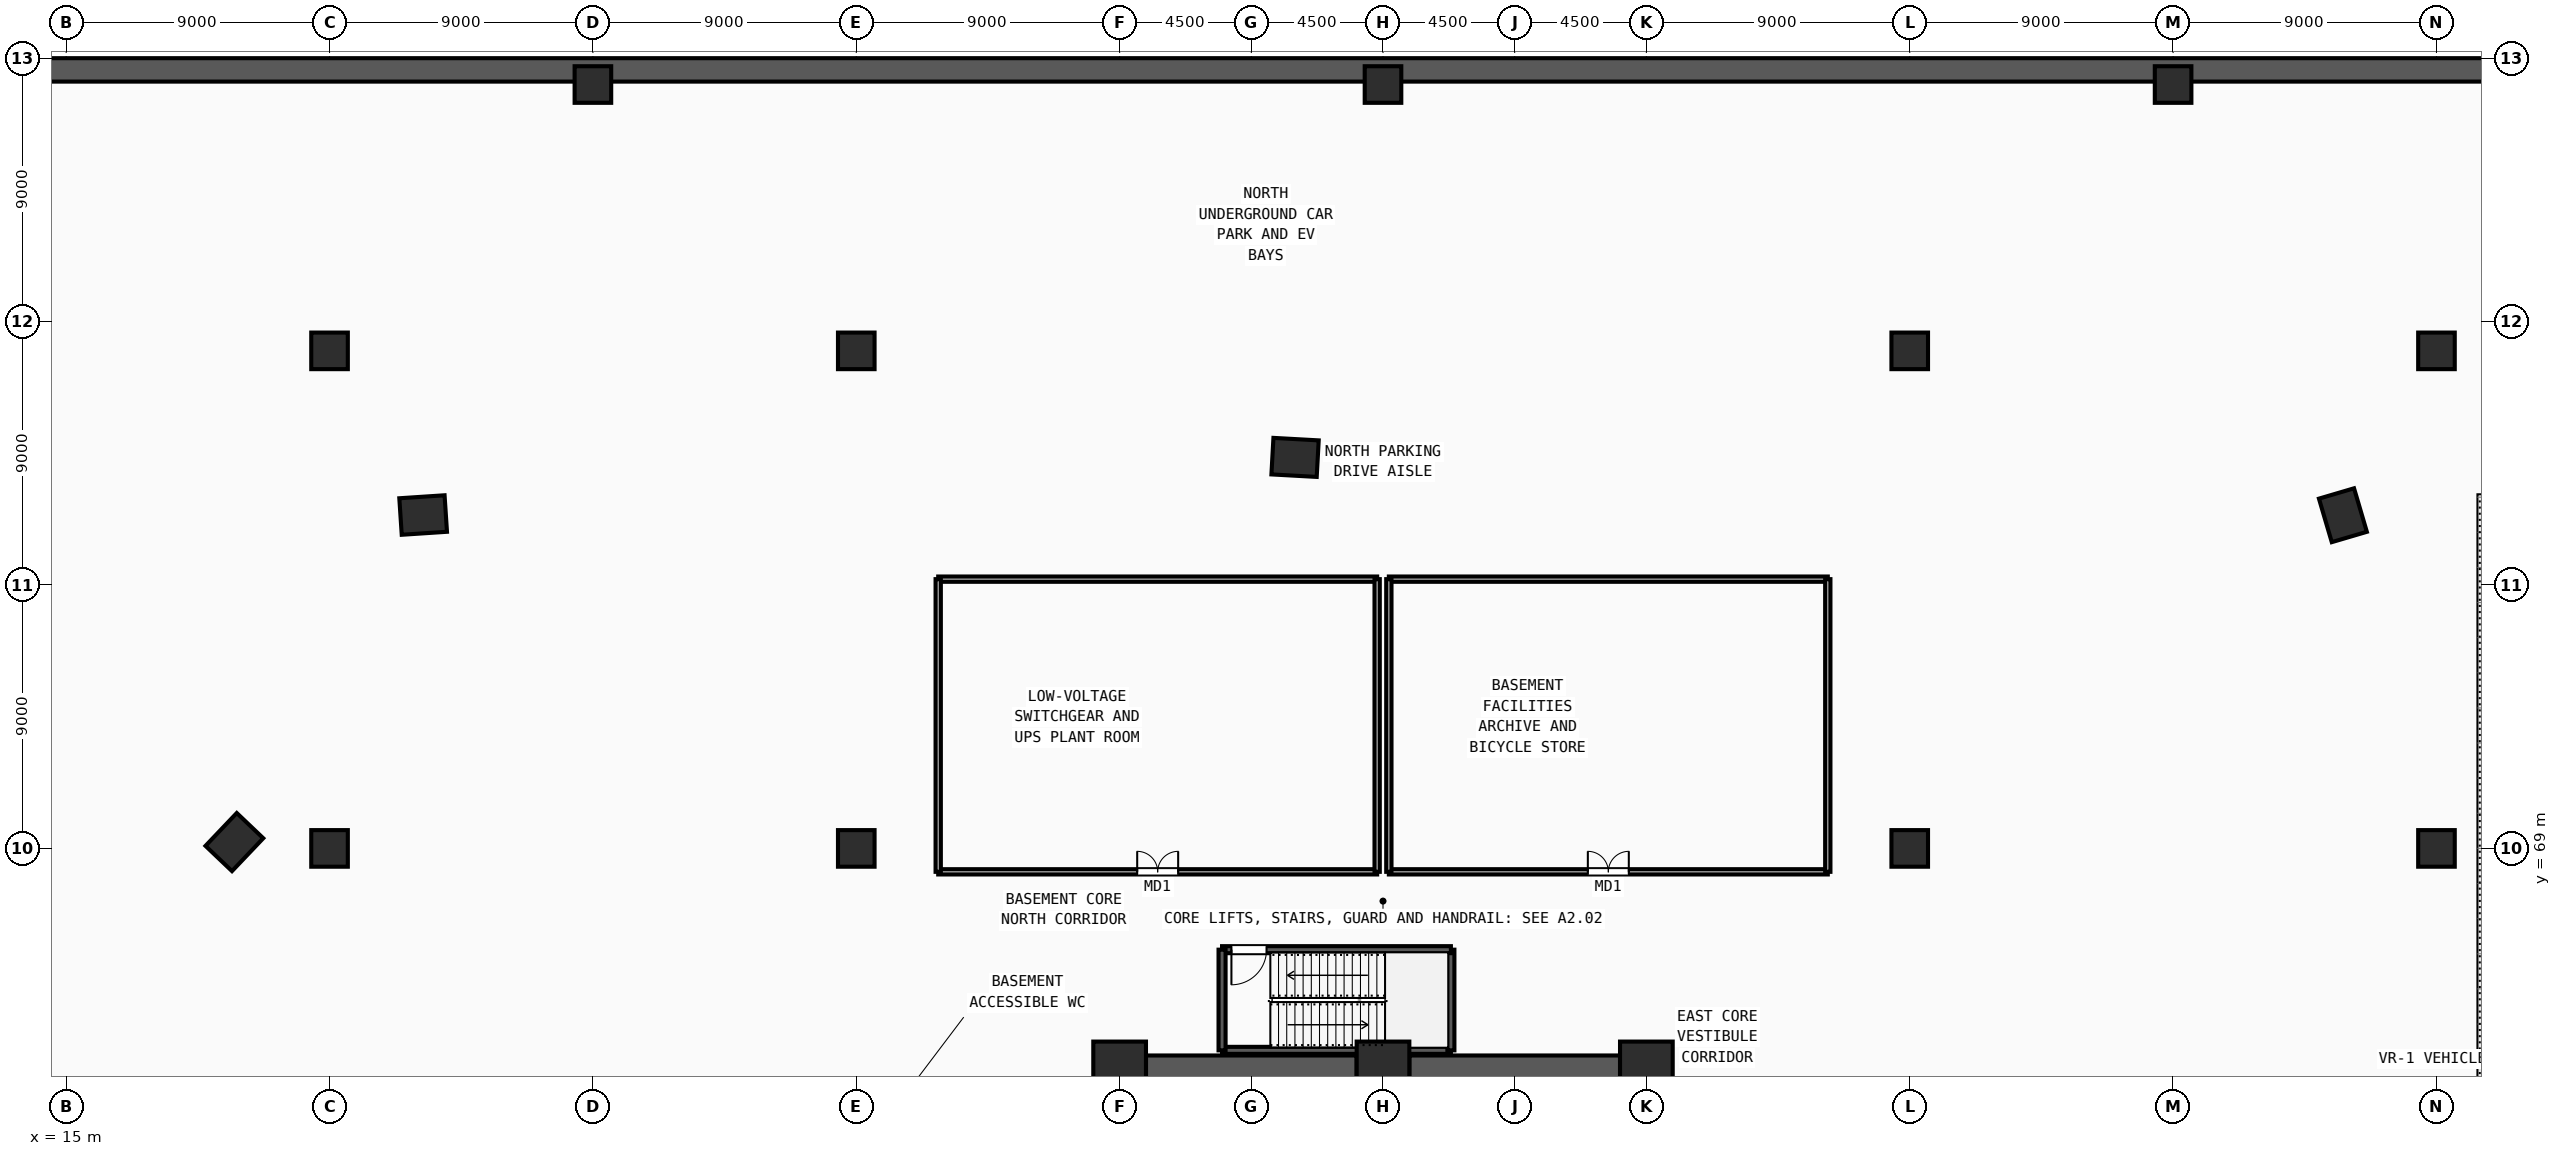
"""IFC4 building model, lengths in metres.
Left out: names, types, materials, properties, quantities, classifications, styles, units other than length and angle.
Written with IfcOpenShell. Run it as: python <this file> out.ifc"""

import sys

from ifc_helpers import new_model, si_unit, direction, frame, frame_2d, origin, origin_2d, place, context, subcontext, project, spatial, rectangle, extrude, source, transform, mapped, element, fill, save


model = new_model("IFC4")
c1 = context("Model", 3, precision=1e-05, world=origin(), true_north=direction((0.0, 1.0)))
c2 = subcontext(c1, "Body", "Model", "MODEL_VIEW")
j1 = project(units=[si_unit("LENGTHUNIT", "METRE"), si_unit("PLANEANGLEUNIT", "RADIAN")], contexts=[c1])
p1 = place(None, origin())
s1 = spatial("IfcSite", under=j1, at=p1, CompositionType="ELEMENT")
p2 = place(p1, origin())
s2 = spatial("IfcBuilding", under=s1, at=p2, CompositionType="ELEMENT")
p3 = place(p2, frame((0.0, 0.0, -4.8)))
s3 = spatial("IfcBuildingStorey", under=s2, at=p3, CompositionType="ELEMENT", Elevation=-4.8)
m1 = source(origin(), c2, "Body", "SweptSolid", [
    extrude(rectangle(XDim=1.8, YDim=1.8, at=origin_2d()), origin(), (0.0, 0.0, 1.0), 4.8),
])
for number, where, z_axis, x_axis in (
    (1, (69.0, 61.5, 0.0), (0.0, 0.0, 1.0), (1.0, 0.0, 0.0)),
    (2, (60.0, 61.5, 0.0), (0.0, 0.0, 1.0), (1.0, 0.0, 0.0)),
    (3, (51.0, 61.5, 0.0), (0.0, 0.0, 1.0), (1.0, 0.0, 0.0)),
):
    element("IfcColumn", number, at=place(p3, frame(where, z_axis=z_axis, x_axis=x_axis)), inside=s3, PredefinedType="COLUMN", context=c2, shape_type="MappedRepresentation", body=[
        mapped(m1, transform((0.0, 0.0, 0.0), x_axis=(1.0, 0.0, 0.0), y_axis=(0.0, 1.0, 0.0), z_axis=(0.0, 0.0, 1.0), scale=1.0)),
    ])
m2 = source(origin(), c2, "Body", "SweptSolid", [
    extrude(rectangle(XDim=1.55, YDim=1.25, at=origin_2d()), origin(), (0.0, 0.0, 1.0), 4.8),
])
for number, where, z_axis, x_axis in (
    (4, (20.748, 69.217, 0.0), (0.0, 0.0, 1.0), (0.689, 0.724, 0.0)),
    (5, (27.199, 80.391, 0.0), (0.0, 0.0, 1.0), (0.998, 0.066, 0.0)),
    (6, (92.803, 80.384, 0.0), (0.0, 0.0, 1.0), (-0.283, 0.959, 0.0)),
    (7, (56.995, 82.36, 0.0), (0.0, 0.0, 1.0), (-0.998, 0.055, 0.0)),
):
    element("IfcColumn", number, at=place(p3, frame(where, z_axis=z_axis, x_axis=x_axis)), inside=s3, PredefinedType="COLUMN", context=c2, shape_type="MappedRepresentation", body=[
        mapped(m2, transform((0.0, 0.0, 0.0), x_axis=(1.0, 0.0, 0.0), y_axis=(0.0, 1.0, 0.0), z_axis=(0.0, 0.0, 1.0), scale=1.0)),
    ])
m3 = source(origin(), c2, "Body", "SweptSolid", [
    extrude(rectangle(XDim=1.25, YDim=1.25, at=origin_2d()), origin(), (0.0, 0.0, 1.0), 4.8),
])
for number, where, z_axis, x_axis in (
    (8, (24.0, 69.0, 0.0), (0.0, 0.0, 1.0), (1.0, 0.0, 0.0)),
    (9, (42.0, 69.0, 0.0), (0.0, 0.0, 1.0), (1.0, 0.0, 0.0)),
    (10, (78.0, 69.0, 0.0), (0.0, 0.0, 1.0), (1.0, 0.0, 0.0)),
    (11, (96.0, 69.0, 0.0), (0.0, 0.0, 1.0), (1.0, 0.0, 0.0)),
    (12, (24.0, 86.0, 0.0), (0.0, 0.0, 1.0), (1.0, 0.0, 0.0)),
    (13, (42.0, 86.0, 0.0), (0.0, 0.0, 1.0), (1.0, 0.0, 0.0)),
    (14, (78.0, 86.0, 0.0), (0.0, 0.0, 1.0), (1.0, 0.0, 0.0)),
    (15, (96.0, 86.0, 0.0), (0.0, 0.0, 1.0), (1.0, 0.0, 0.0)),
    (16, (33.0, 95.1, 0.0), (0.0, 0.0, 1.0), (1.0, 0.0, 0.0)),
    (17, (60.0, 95.1, 0.0), (0.0, 0.0, 1.0), (1.0, 0.0, 0.0)),
    (18, (87.0, 95.1, 0.0), (0.0, 0.0, 1.0), (1.0, 0.0, 0.0)),
):
    element("IfcColumn", number, at=place(p3, frame(where, z_axis=z_axis, x_axis=x_axis)), inside=s3, PredefinedType="COLUMN", context=c2, shape_type="MappedRepresentation", body=[
        mapped(m3, transform((0.0, 0.0, 0.0), x_axis=(1.0, 0.0, 0.0), y_axis=(0.0, 1.0, 0.0), z_axis=(0.0, 0.0, 1.0), scale=1.0)),
    ])
p4 = place(p3, frame((6.8, 95.6, 0.0), z_axis=(0.0, 0.0, 1.0), x_axis=(1.0, 0.0, 0.0)))
e19 = element("IfcWall", 19, at=p4, inside=s3, PredefinedType="USERDEFINED", context=c2, shape_type="SweptSolid", body=[
    extrude(rectangle(XDim=106.4, YDim=0.8, at=frame_2d((53.2, 0.0))), origin(), (0.0, 0.0, 1.0), 4.55),
])
for number, where, z_axis, x_axis in (
    (20, (51.9, 61.5, 0.0), (0.0, 0.0, 1.0), (1.0, 0.0, 0.0)),
    (21, (60.9, 61.5, 0.0), (0.0, 0.0, 1.0), (1.0, 0.0, 0.0)),
):
    element("IfcWall", number, at=place(p3, frame(where, z_axis=z_axis, x_axis=x_axis)), inside=s3, PredefinedType="SHEAR", context=c2, shape_type="SweptSolid", body=[
        extrude(rectangle(XDim=7.2, YDim=0.85, at=frame_2d((3.6, 0.0))), origin(), (0.0, 0.0, 1.0), 4.55),
    ])
p5 = place(p3, frame((54.5, 62.1, 0.0), z_axis=(0.0, 0.0, 1.0), x_axis=(1.0, 0.0, 0.0)))
e22 = element("IfcWall", 22, at=p5, inside=s3, PredefinedType="SOLIDWALL", context=c2, shape_type="SweptSolid", body=[
    extrude(rectangle(XDim=7.82, YDim=0.24, at=frame_2d((3.91, 0.0))), origin(), (0.0, 0.0, 1.0), 4.55),
])
p6 = place(p3, frame((62.32, 62.1, 0.0), z_axis=(0.0, 0.0, 1.0), x_axis=(0.0, 1.0, 0.0)))
e23 = element("IfcWall", 23, at=p6, inside=s3, PredefinedType="SOLIDWALL", context=c2, shape_type="SweptSolid", body=[
    extrude(rectangle(XDim=3.44, YDim=0.24, at=frame_2d((1.72, 0.0))), origin(), (0.0, 0.0, 1.0), 4.55),
])
p7 = place(p3, frame((62.32, 65.54, 0.0), z_axis=(0.0, 0.0, 1.0), x_axis=(-1.0, 0.0, 0.0)))
e24 = element("IfcWall", 24, at=p7, inside=s3, PredefinedType="SOLIDWALL", context=c2, shape_type="SweptSolid", body=[
    extrude(rectangle(XDim=7.82, YDim=0.24, at=frame_2d((3.91, 0.0))), origin(), (0.0, 0.0, 1.0), 4.55),
])
m4 = source(origin(), c2, "Body", "SweptSolid", [
    extrude(rectangle(XDim=1.2, YDim=2.2, at=frame_2d((0.6, 1.1))), frame((0.0, 0.13, 0.0), z_axis=(0.0, -1.0, 0.0), x_axis=(1.0, 0.0, 0.0)), (0.0, 0.0, 1.0), 0.26),
])
p8 = place(p7, frame((6.3, 0.0, 0.0)))
e25 = element("IfcOpeningElement", 25, at=p8, cuts=e24, PredefinedType="OPENING", context=c2, shape_type="MappedRepresentation", body=[
    mapped(m4, transform((0.0, 0.0, 0.0), x_axis=(1.0, 0.0, 0.0), y_axis=(0.0, 1.0, 0.0), z_axis=(0.0, 0.0, 1.0), scale=1.0)),
])
p9 = place(p3, frame((54.5, 65.54, 0.0), z_axis=(0.0, 0.0, 1.0), x_axis=(0.0, -1.0, 0.0)))
e26 = element("IfcWall", 26, at=p9, inside=s3, PredefinedType="SOLIDWALL", context=c2, shape_type="SweptSolid", body=[
    extrude(rectangle(XDim=3.44, YDim=0.24, at=frame_2d((1.72, 0.0))), origin(), (0.0, 0.0, 1.0), 4.55),
])
p10 = place(p3, frame((44.8, 68.2, 0.0), z_axis=(0.0, 0.0, 1.0), x_axis=(1.0, 0.0, 0.0)))
e27 = element("IfcWall", 27, at=p10, inside=s3, PredefinedType="PARTITIONING", context=c2, shape_type="SweptSolid", body=[
    extrude(rectangle(XDim=15.0, YDim=0.18, at=frame_2d((7.5, 0.0))), origin(), (0.0, 0.0, 1.0), 4.55),
])
m5 = source(origin(), c2, "Body", "SweptSolid", [
    extrude(rectangle(XDim=1.4, YDim=2.25, at=frame_2d((0.7, 1.125))), frame((0.0, 0.1, 0.0), z_axis=(0.0, -1.0, 0.0), x_axis=(1.0, 0.0, 0.0)), (0.0, 0.0, 1.0), 0.2),
])
p11 = place(p10, frame((6.8, 0.0, 0.0)))
e28 = element("IfcOpeningElement", 28, at=p11, cuts=e27, PredefinedType="OPENING", context=c2, shape_type="MappedRepresentation", body=[
    mapped(m5, transform((0.0, 0.0, 0.0), x_axis=(1.0, 0.0, 0.0), y_axis=(0.0, 1.0, 0.0), z_axis=(0.0, 0.0, 1.0), scale=1.0)),
])
p12 = place(p3, frame((60.2, 68.2, 0.0), z_axis=(0.0, 0.0, 1.0), x_axis=(1.0, 0.0, 0.0)))
e29 = element("IfcWall", 29, at=p12, inside=s3, PredefinedType="PARTITIONING", context=c2, shape_type="SweptSolid", body=[
    extrude(rectangle(XDim=15.0, YDim=0.18, at=frame_2d((7.5, 0.0))), origin(), (0.0, 0.0, 1.0), 4.55),
])
p13 = place(p12, frame((6.8, 0.0, 0.0)))
e30 = element("IfcOpeningElement", 30, at=p13, cuts=e29, PredefinedType="OPENING", context=c2, shape_type="MappedRepresentation", body=[
    mapped(m5, transform((0.0, 0.0, 0.0), x_axis=(1.0, 0.0, 0.0), y_axis=(0.0, 1.0, 0.0), z_axis=(0.0, 0.0, 1.0), scale=1.0)),
])
p14 = place(p3, frame((44.8, 78.2, 0.0), z_axis=(0.0, 0.0, 1.0), x_axis=(1.0, 0.0, 0.0)))
e31 = element("IfcWall", 31, at=p14, inside=s3, PredefinedType="PARTITIONING", context=c2, shape_type="SweptSolid", body=[
    extrude(rectangle(XDim=15.0, YDim=0.18, at=frame_2d((7.5, 0.0))), origin(), (0.0, 0.0, 1.0), 4.55),
])
for number, where, z_axis, x_axis in (
    (32, (44.8, 68.2, 0.0), (0.0, 0.0, 1.0), (0.0, 1.0, 0.0)),
    (33, (59.8, 68.2, 0.0), (0.0, 0.0, 1.0), (0.0, 1.0, 0.0)),
):
    element("IfcWall", number, at=place(p3, frame(where, z_axis=z_axis, x_axis=x_axis)), inside=s3, PredefinedType="PARTITIONING", context=c2, shape_type="SweptSolid", body=[
        extrude(rectangle(XDim=10.0, YDim=0.18, at=frame_2d((5.0, 0.0))), origin(), (0.0, 0.0, 1.0), 4.55),
    ])
p15 = place(p3, frame((60.2, 78.2, 0.0), z_axis=(0.0, 0.0, 1.0), x_axis=(1.0, 0.0, 0.0)))
e34 = element("IfcWall", 34, at=p15, inside=s3, PredefinedType="PARTITIONING", context=c2, shape_type="SweptSolid", body=[
    extrude(rectangle(XDim=15.0, YDim=0.18, at=frame_2d((7.5, 0.0))), origin(), (0.0, 0.0, 1.0), 4.55),
])
for number, where, z_axis, x_axis in (
    (35, (60.2, 68.2, 0.0), (0.0, 0.0, 1.0), (0.0, 1.0, 0.0)),
    (36, (75.2, 68.2, 0.0), (0.0, 0.0, 1.0), (0.0, 1.0, 0.0)),
):
    element("IfcWall", number, at=place(p3, frame(where, z_axis=z_axis, x_axis=x_axis)), inside=s3, PredefinedType="PARTITIONING", context=c2, shape_type="SweptSolid", body=[
        extrude(rectangle(XDim=10.0, YDim=0.18, at=frame_2d((5.0, 0.0))), origin(), (0.0, 0.0, 1.0), 4.55),
    ])
m6 = source(origin(), c2, "Body", "SweptSolid", [
    extrude(rectangle(XDim=1.2, YDim=2.2, at=frame_2d((0.6, 1.1))), frame((0.0, 0.025, 0.0), z_axis=(0.0, -1.0, 0.0), x_axis=(1.0, 0.0, 0.0)), (0.0, 0.0, 1.0), 0.05),
])
p16 = place(p8, origin())
e37 = element("IfcDoor", 37, at=p16, inside=s3, OperationType="SINGLE_SWING_RIGHT", PredefinedType="DOOR", context=c2, shape_type="MappedRepresentation", body=[
    mapped(m6, transform((0.0, 0.0, 0.0), x_axis=(1.0, 0.0, 0.0), y_axis=(0.0, 1.0, 0.0), z_axis=(0.0, 0.0, 1.0), scale=1.0)),
])
fill(e25, e37)
m7 = source(origin(), c2, "Body", "SweptSolid", [
    extrude(rectangle(XDim=1.4, YDim=2.25, at=frame_2d((0.7, 1.125))), frame((0.0, 0.025, 0.0), z_axis=(0.0, -1.0, 0.0), x_axis=(1.0, 0.0, 0.0)), (0.0, 0.0, 1.0), 0.05),
])
p17 = place(p11, origin())
e38 = element("IfcDoor", 38, at=p17, inside=s3, OperationType="DOUBLE_DOOR_SINGLE_SWING", PredefinedType="DOOR", context=c2, shape_type="MappedRepresentation", body=[
    mapped(m7, transform((0.0, 0.0, 0.0), x_axis=(1.0, 0.0, 0.0), y_axis=(0.0, 1.0, 0.0), z_axis=(0.0, 0.0, 1.0), scale=1.0)),
])
fill(e28, e38)
p18 = place(p13, origin())
e39 = element("IfcDoor", 39, at=p18, inside=s3, OperationType="DOUBLE_DOOR_SINGLE_SWING", PredefinedType="DOOR", context=c2, shape_type="MappedRepresentation", body=[
    mapped(m7, transform((0.0, 0.0, 0.0), x_axis=(1.0, 0.0, 0.0), y_axis=(0.0, 1.0, 0.0), z_axis=(0.0, 0.0, 1.0), scale=1.0)),
])
fill(e30, e39)
save(model, sys.argv[1])
